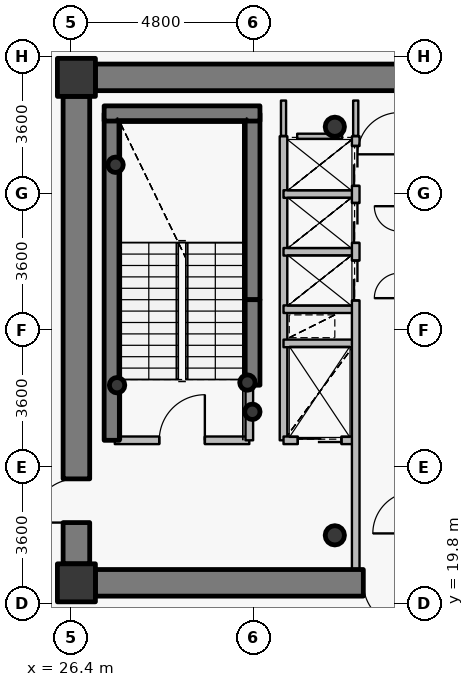
"""IFC4 building model, lengths in metres.
Left out: names, types, materials, properties, quantities, classifications, styles, units other than length and angle.
Written with IfcOpenShell. Run it as: python <this file> out.ifc"""

import sys

from ifc_helpers import new_model, si_unit, direction, frame, frame_2d, origin, origin_2d, place, context, subcontext, project, spatial, rectangle, hollow_circle, extrude, source, transform, mapped, element, fill, save


model = new_model("IFC4")
c1 = context("Model", 3, precision=1e-05, world=origin(), true_north=direction((0.0, 1.0)))
c2 = subcontext(c1, "Body", "Model", "MODEL_VIEW")
j1 = project(units=[si_unit("LENGTHUNIT", "METRE"), si_unit("PLANEANGLEUNIT", "RADIAN")], contexts=[c1])
p1 = place(None, origin())
s1 = spatial("IfcSite", under=j1, at=p1, CompositionType="ELEMENT")
p2 = place(p1, origin())
s2 = spatial("IfcBuilding", under=s1, at=p2, CompositionType="ELEMENT")
p3 = place(p2, frame((0.0, 0.0, 214.05)))
s3 = spatial("IfcBuildingStorey", under=s2, at=p3, CompositionType="ELEMENT", Elevation=214.05)
for number, where, z_axis, x_axis in (
    (1, (26.55, 20.35, 0.0), (0.0, 0.0, 1.0), (1.0, 0.0, 0.0)),
    (2, (26.55, 33.65, 0.0), (0.0, 0.0, 1.0), (1.0, 0.0, 0.0)),
):
    element("IfcColumn", number, at=place(p3, frame(where, z_axis=z_axis, x_axis=x_axis)), inside=s3, PredefinedType="COLUMN", context=c2, shape_type="SweptSolid", body=[
        extrude(rectangle(XDim=1.0, YDim=1.0, at=origin_2d()), origin(), (0.0, 0.0, 1.0), 3.75),
    ])
for number, where, z_axis, x_axis in (
    (3, (33.35, 21.6, 0.0), (0.0, 0.0, 1.0), (1.0, 0.0, 0.0)),
    (4, (33.35, 32.35, 0.0), (0.0, 0.0, 1.0), (1.0, 0.0, 0.0)),
):
    element("IfcColumn", number, at=place(p3, frame(where, z_axis=z_axis, x_axis=x_axis)), inside=s3, PredefinedType="COLUMN", context=c2, shape_type="SweptSolid", body=[
        extrude(hollow_circle(Radius=0.254, WallThickness=0.02, at=origin_2d()), origin(), (0.0, 0.0, 1.0), 3.75),
    ])
p4 = place(p3, frame((27.48, 24.1, 0.0), z_axis=(0.0, 0.0, 1.0), x_axis=(0.0, 1.0, 0.0)))
e5 = element("IfcWall", 5, at=p4, inside=s3, PredefinedType="SHEAR", context=c2, shape_type="SweptSolid", body=[
    extrude(rectangle(XDim=8.6, YDim=0.4, at=frame_2d((4.3, 0.0))), origin(), (0.0, 0.0, 1.0), 3.75),
])
p5 = place(p3, frame((31.18, 27.8, 0.0), z_axis=(0.0, 0.0, 1.0), x_axis=(0.0, 1.0, 0.0)))
e6 = element("IfcWall", 6, at=p5, inside=s3, PredefinedType="SHEAR", context=c2, shape_type="SweptSolid", body=[
    extrude(rectangle(XDim=4.9, YDim=0.4, at=frame_2d((2.45, 0.0))), origin(), (0.0, 0.0, 1.0), 3.75),
])
p6 = place(p3, frame((27.28, 32.7, 0.0), z_axis=(0.0, 0.0, 1.0), x_axis=(1.0, 0.0, 0.0)))
e7 = element("IfcWall", 7, at=p6, inside=s3, PredefinedType="SHEAR", context=c2, shape_type="SweptSolid", body=[
    extrude(rectangle(XDim=4.1, YDim=0.4, at=frame_2d((2.05, 0.0))), origin(), (0.0, 0.0, 1.0), 3.75),
])
for number, where, z_axis, x_axis in (
    (8, (27.58, 31.35, 0.0), (0.0, 0.0, 1.0), (1.0, 0.0, 0.0)),
    (9, (31.05, 25.62, 0.0), (0.0, 0.0, 1.0), (1.0, 0.0, 0.0)),
    (10, (31.18, 24.85, 0.0), (0.0, 0.0, 1.0), (1.0, 0.0, 0.0)),
    (11, (27.62, 25.55, 0.0), (0.0, 0.0, 1.0), (1.0, 0.0, 0.0)),
):
    element("IfcColumn", number, at=place(p3, frame(where, z_axis=z_axis, x_axis=x_axis)), inside=s3, PredefinedType="COLUMN", context=c2, shape_type="SweptSolid", body=[
        extrude(hollow_circle(Radius=0.203, WallThickness=0.016, at=origin_2d()), origin(), (0.0, 0.0, 1.0), 3.75),
    ])
p7 = place(p3, frame((27.05, 33.65, 0.0), z_axis=(0.0, 0.0, 1.0), x_axis=(1.0, 0.0, 0.0)))
e12 = element("IfcWall", 12, at=p7, inside=s3, PredefinedType="SHEAR", context=c2, shape_type="SweptSolid", body=[
    extrude(rectangle(XDim=17.9, YDim=0.7, at=frame_2d((8.95, 0.0))), origin(), (0.0, 0.0, 1.0), 3.05),
])
p8 = place(p7, frame((13.675, 0.0, 0.0)))
e13 = element("IfcOpeningElement", 13, at=p8, cuts=e12, PredefinedType="OPENING", context=c2, shape_type="SweptSolid", body=[
    extrude(rectangle(XDim=1.15, YDim=2.15, at=origin_2d()), frame((0.575, 0.36, 1.075), z_axis=(0.0, -1.0, 0.0), x_axis=(1.0, 0.0, 0.0)), (0.0, 0.0, 1.0), 0.72),
])
p9 = place(p3, frame((44.95, 20.35, 0.0), z_axis=(0.0, 0.0, 1.0), x_axis=(-1.0, 0.0, 0.0)))
e14 = element("IfcWall", 14, at=p9, inside=s3, PredefinedType="SHEAR", context=c2, shape_type="SweptSolid", body=[
    extrude(rectangle(XDim=17.9, YDim=0.7, at=frame_2d((8.95, 0.0))), origin(), (0.0, 0.0, 1.0), 3.05),
])
p10 = place(p9, frame((9.7, 0.0, 0.0)))
e15 = element("IfcOpeningElement", 15, at=p10, cuts=e14, PredefinedType="OPENING", context=c2, shape_type="SweptSolid", body=[
    extrude(rectangle(XDim=1.15, YDim=2.15, at=origin_2d()), frame((0.575, 0.36, 1.075), z_axis=(0.0, -1.0, 0.0), x_axis=(1.0, 0.0, 0.0)), (0.0, 0.0, 1.0), 0.72),
])
p11 = place(p3, frame((26.55, 20.85, 0.0), z_axis=(0.0, 0.0, 1.0), x_axis=(0.0, 1.0, 0.0)))
e16 = element("IfcWall", 16, at=p11, inside=s3, PredefinedType="SHEAR", context=c2, shape_type="SweptSolid", body=[
    extrude(rectangle(XDim=12.3, YDim=0.7, at=frame_2d((6.15, 0.0))), origin(), (0.0, 0.0, 1.0), 3.05),
])
p12 = place(p11, frame((1.085, 0.0, 0.0)))
e17 = element("IfcOpeningElement", 17, at=p12, cuts=e16, PredefinedType="OPENING", context=c2, shape_type="SweptSolid", body=[
    extrude(rectangle(XDim=1.15, YDim=2.15, at=origin_2d()), frame((0.575, 0.36, 1.075), z_axis=(0.0, -1.0, 0.0), x_axis=(1.0, 0.0, 0.0)), (0.0, 0.0, 1.0), 0.72),
])
p13 = place(p3, frame((31.18, 25.55, 0.0), z_axis=(0.0, 0.0, 1.0), x_axis=(0.0, 1.0, 0.0)))
e18 = element("IfcWall", 18, at=p13, inside=s3, PredefinedType="SHEAR", context=c2, shape_type="SweptSolid", body=[
    extrude(rectangle(XDim=2.25, YDim=0.4, at=frame_2d((1.125, 0.0))), origin(), (0.0, 0.0, 1.0), 3.1),
])
p14 = place(p3, frame((27.56, 24.1, 0.0), z_axis=(0.0, 0.0, 1.0), x_axis=(1.0, 0.0, 0.0)))
e19 = element("IfcWall", 19, at=p14, inside=s3, PredefinedType="PARTITIONING", context=c2, shape_type="SweptSolid", body=[
    extrude(rectangle(XDim=3.54, YDim=0.2, at=frame_2d((1.77, 0.0))), origin(), (0.0, 0.0, 1.0), 3.5),
])
p15 = place(p14, frame((1.17, 0.0, 0.0)))
e20 = element("IfcOpeningElement", 20, at=p15, cuts=e19, PredefinedType="OPENING", context=c2, shape_type="SweptSolid", body=[
    extrude(rectangle(XDim=1.2, YDim=2.15, at=origin_2d()), frame((0.6, 0.11, 1.075), z_axis=(0.0, -1.0, 0.0), x_axis=(1.0, 0.0, 0.0)), (0.0, 0.0, 1.0), 0.22),
])
p16 = place(p3, frame((31.1, 24.1, 0.0), z_axis=(0.0, 0.0, 1.0), x_axis=(0.0, 1.0, 0.0)))
e21 = element("IfcWall", 21, at=p16, inside=s3, PredefinedType="PARTITIONING", context=c2, shape_type="SweptSolid", body=[
    extrude(rectangle(XDim=1.44, YDim=0.2, at=frame_2d((0.72, 0.0))), origin(), (0.0, 0.0, 1.0), 3.5),
])
p17 = place(p3, frame((32.0, 24.1, 0.0), z_axis=(0.0, 0.0, 1.0), x_axis=(0.0, 1.0, 0.0)))
e22 = element("IfcWall", 22, at=p17, inside=s3, PredefinedType="PARTITIONING", context=c2, shape_type="SweptSolid", body=[
    extrude(rectangle(XDim=8.0, YDim=0.2, at=frame_2d((4.0, 0.0))), origin(), (0.0, 0.0, 1.0), 3.5),
])
p18 = place(p3, frame((32.0, 24.1, 0.0), z_axis=(0.0, 0.0, 1.0), x_axis=(1.0, 0.0, 0.0)))
e23 = element("IfcWall", 23, at=p18, inside=s3, PredefinedType="PARTITIONING", context=c2, shape_type="SweptSolid", body=[
    extrude(rectangle(XDim=1.9, YDim=0.2, at=frame_2d((0.95, 0.0))), origin(), (0.0, 0.0, 1.0), 3.085),
])
p19 = place(p18, frame((0.375, 0.0, 0.0)))
e24 = element("IfcOpeningElement", 24, at=p19, cuts=e23, PredefinedType="OPENING", context=c2, shape_type="SweptSolid", body=[
    extrude(rectangle(XDim=1.15, YDim=2.15, at=origin_2d()), frame((0.575, 0.11, 1.075), z_axis=(0.0, -1.0, 0.0), x_axis=(1.0, 0.0, 0.0)), (0.0, 0.0, 1.0), 0.22),
])
for number, where, z_axis, x_axis in (
    (25, (32.0, 26.65, 0.0), (0.0, 0.0, 1.0), (1.0, 0.0, 0.0)),
    (26, (32.0, 27.55, 0.0), (0.0, 0.0, 1.0), (1.0, 0.0, 0.0)),
    (27, (32.0, 29.06, 0.0), (0.0, 0.0, 1.0), (1.0, 0.0, 0.0)),
    (28, (32.0, 30.58, 0.0), (0.0, 0.0, 1.0), (1.0, 0.0, 0.0)),
):
    element("IfcWall", number, at=place(p3, frame(where, z_axis=z_axis, x_axis=x_axis)), inside=s3, PredefinedType="PARTITIONING", context=c2, shape_type="SweptSolid", body=[
        extrude(rectangle(XDim=1.9, YDim=0.2, at=frame_2d((0.95, 0.0))), origin(), (0.0, 0.0, 1.0), 3.085),
    ])
p20 = place(p3, frame((33.9, 20.7, 0.0), z_axis=(0.0, 0.0, 1.0), x_axis=(0.0, 1.0, 0.0)))
e29 = element("IfcWall", 29, at=p20, inside=s3, PredefinedType="PARTITIONING", context=c2, shape_type="SweptSolid", body=[
    extrude(rectangle(XDim=11.4, YDim=0.2, at=frame_2d((5.7, 0.0))), origin(), (0.0, 0.0, 1.0), 3.085),
])
p21 = place(p20, frame((7.08, 0.0, 0.0)))
e30 = element("IfcOpeningElement", 30, at=p21, cuts=e29, PredefinedType="OPENING", context=c2, shape_type="SweptSolid", body=[
    extrude(rectangle(XDim=1.05, YDim=2.15, at=origin_2d()), frame((0.525, 0.11, 1.075), z_axis=(0.0, -1.0, 0.0), x_axis=(1.0, 0.0, 0.0)), (0.0, 0.0, 1.0), 0.22),
])
p22 = place(p20, frame((8.595, 0.0, 0.0)))
e31 = element("IfcOpeningElement", 31, at=p22, cuts=e29, PredefinedType="OPENING", context=c2, shape_type="SweptSolid", body=[
    extrude(rectangle(XDim=1.05, YDim=2.15, at=origin_2d()), frame((0.525, 0.11, 1.075), z_axis=(0.0, -1.0, 0.0), x_axis=(1.0, 0.0, 0.0)), (0.0, 0.0, 1.0), 0.22),
])
p23 = place(p20, frame((10.095, 0.0, 0.0)))
e32 = element("IfcOpeningElement", 32, at=p23, cuts=e29, PredefinedType="OPENING", context=c2, shape_type="SweptSolid", body=[
    extrude(rectangle(XDim=1.05, YDim=2.15, at=origin_2d()), frame((0.525, 0.11, 1.075), z_axis=(0.0, -1.0, 0.0), x_axis=(1.0, 0.0, 0.0)), (0.0, 0.0, 1.0), 0.22),
])
p24 = place(p3, frame((32.36, 32.1, 0.0), z_axis=(0.0, 0.0, 1.0), x_axis=(1.0, 0.0, 0.0)))
e33 = element("IfcWall", 33, at=p24, inside=s3, PredefinedType="PARTITIONING", context=c2, shape_type="SweptSolid", body=[
    extrude(rectangle(XDim=1.18, YDim=0.135, at=frame_2d((0.59, 0.0))), origin(), (0.0, 0.0, 1.0), 3.085),
])
p25 = place(p3, frame((32.0, 33.04, 0.0), z_axis=(0.0, 0.0, 1.0), x_axis=(0.0, -1.0, 0.0)))
e34 = element("IfcWall", 34, at=p25, inside=s3, PredefinedType="PARTITIONING", context=c2, shape_type="SweptSolid", body=[
    extrude(rectangle(XDim=0.93, YDim=0.135, at=frame_2d((0.465, 0.0))), origin(), (0.0, 0.0, 1.0), 3.035),
])
p26 = place(p3, frame((33.9, 32.11, 0.0), z_axis=(0.0, 0.0, 1.0), x_axis=(0.0, 1.0, 0.0)))
e35 = element("IfcWall", 35, at=p26, inside=s3, PredefinedType="PARTITIONING", context=c2, shape_type="SweptSolid", body=[
    extrude(rectangle(XDim=0.93, YDim=0.135, at=frame_2d((0.465, 0.0))), origin(), (0.0, 0.0, 1.0), 3.085),
])
p27 = place(p3, frame((27.04, 34.0, 0.0), z_axis=(0.0, 0.0, 1.0), x_axis=(-1.0, 0.0, 0.0)))
e36 = element("IfcWall", 36, at=p27, inside=s3, PredefinedType="PARTITIONING", context=c2, shape_type="SweptSolid", body=[
    extrude(rectangle(XDim=0.84, YDim=0.135, at=frame_2d((0.42, 0.0))), origin(), (0.0, 0.0, 1.0), 2.935),
])
p28 = place(p3, frame((26.2, 33.692, 0.0), z_axis=(0.0, 0.0, 1.0), x_axis=(0.0, -1.0, 0.0)))
e37 = element("IfcWall", 37, at=p28, inside=s3, PredefinedType="PARTITIONING", context=c2, shape_type="SweptSolid", body=[
    extrude(rectangle(XDim=0.532, YDim=0.135, at=frame_2d((0.266, 0.0))), origin(), (0.0, 0.0, 1.0), 3.5),
])
p29 = place(p3, frame((26.2, 20.84, 0.0), z_axis=(0.0, 0.0, 1.0), x_axis=(0.0, -1.0, 0.0)))
e38 = element("IfcWall", 38, at=p29, inside=s3, PredefinedType="PARTITIONING", context=c2, shape_type="SweptSolid", body=[
    extrude(rectangle(XDim=0.84, YDim=0.135, at=frame_2d((0.42, 0.0))), origin(), (0.0, 0.0, 1.0), 3.5),
])
p30 = place(p3, frame((26.508, 20.0, 0.0), z_axis=(0.0, 0.0, 1.0), x_axis=(1.0, 0.0, 0.0)))
e39 = element("IfcWall", 39, at=p30, inside=s3, PredefinedType="PARTITIONING", context=c2, shape_type="SweptSolid", body=[
    extrude(rectangle(XDim=0.532, YDim=0.135, at=frame_2d((0.266, 0.0))), origin(), (0.0, 0.0, 1.0), 2.935),
])
m1 = source(origin(), c2, "Body", "SweptSolid", [
    extrude(rectangle(XDim=1.15, YDim=2.15, at=origin_2d()), frame((0.575, 0.025, 1.075), z_axis=(0.0, -1.0, 0.0), x_axis=(1.0, 0.0, 0.0)), (0.0, 0.0, 1.0), 0.05),
])
p31 = place(p12, origin())
e40 = element("IfcDoor", 40, at=p31, inside=s3, OperationType="SINGLE_SWING_LEFT", PredefinedType="DOOR", context=c2, shape_type="MappedRepresentation", body=[
    mapped(m1, transform((0.0, 0.0, 0.0), x_axis=(1.0, 0.0, 0.0), y_axis=(0.0, 1.0, 0.0), z_axis=(0.0, 0.0, 1.0), scale=1.0)),
])
fill(e17, e40)
p32 = place(p10, origin())
e41 = element("IfcDoor", 41, at=p32, inside=s3, OperationType="SINGLE_SWING_LEFT", PredefinedType="DOOR", context=c2, shape_type="MappedRepresentation", body=[
    mapped(m1, transform((0.0, 0.0, 0.0), x_axis=(1.0, 0.0, 0.0), y_axis=(0.0, 1.0, 0.0), z_axis=(0.0, 0.0, 1.0), scale=1.0)),
])
fill(e15, e41)
m2 = source(origin(), c2, "Body", "SweptSolid", [
    extrude(rectangle(XDim=1.2, YDim=2.15, at=origin_2d()), frame((0.6, 0.025, 1.075), z_axis=(0.0, -1.0, 0.0), x_axis=(1.0, 0.0, 0.0)), (0.0, 0.0, 1.0), 0.05),
])
p33 = place(p15, origin())
e42 = element("IfcDoor", 42, at=p33, inside=s3, OperationType="SINGLE_SWING_RIGHT", PredefinedType="DOOR", context=c2, shape_type="MappedRepresentation", body=[
    mapped(m2, transform((0.0, 0.0, 0.0), x_axis=(1.0, 0.0, 0.0), y_axis=(0.0, 1.0, 0.0), z_axis=(0.0, 0.0, 1.0), scale=1.0)),
])
fill(e20, e42)
m3 = source(origin(), c2, "Body", "SweptSolid", [
    extrude(rectangle(XDim=1.15, YDim=2.15, at=origin_2d()), frame((0.575, 0.025, 1.075), z_axis=(0.0, -1.0, 0.0), x_axis=(1.0, 0.0, 0.0)), (0.0, 0.0, 1.0), 0.05),
])
p34 = place(p19, origin())
e43 = element("IfcDoor", 43, at=p34, inside=s3, OperationType="DOUBLE_DOOR_SLIDING", PredefinedType="USERDEFINED", context=c2, shape_type="MappedRepresentation", body=[
    mapped(m3, transform((0.0, 0.0, 0.0), x_axis=(1.0, 0.0, 0.0), y_axis=(0.0, 1.0, 0.0), z_axis=(0.0, 0.0, 1.0), scale=1.0)),
])
fill(e24, e43)
m4 = source(origin(), c2, "Body", "SweptSolid", [
    extrude(rectangle(XDim=1.05, YDim=2.15, at=origin_2d()), frame((0.525, 0.025, 1.075), z_axis=(0.0, -1.0, 0.0), x_axis=(1.0, 0.0, 0.0)), (0.0, 0.0, 1.0), 0.05),
])
p35 = place(p21, origin())
e44 = element("IfcDoor", 44, at=p35, inside=s3, OperationType="DOUBLE_DOOR_SLIDING", PredefinedType="USERDEFINED", context=c2, shape_type="MappedRepresentation", body=[
    mapped(m4, transform((0.0, 0.0, 0.0), x_axis=(1.0, 0.0, 0.0), y_axis=(0.0, 1.0, 0.0), z_axis=(0.0, 0.0, 1.0), scale=1.0)),
])
fill(e30, e44)
p36 = place(p22, origin())
e45 = element("IfcDoor", 45, at=p36, inside=s3, OperationType="DOUBLE_DOOR_SLIDING", PredefinedType="USERDEFINED", context=c2, shape_type="MappedRepresentation", body=[
    mapped(m4, transform((0.0, 0.0, 0.0), x_axis=(1.0, 0.0, 0.0), y_axis=(0.0, 1.0, 0.0), z_axis=(0.0, 0.0, 1.0), scale=1.0)),
])
fill(e31, e45)
p37 = place(p23, origin())
e46 = element("IfcDoor", 46, at=p37, inside=s3, OperationType="DOUBLE_DOOR_SLIDING", PredefinedType="USERDEFINED", context=c2, shape_type="MappedRepresentation", body=[
    mapped(m4, transform((0.0, 0.0, 0.0), x_axis=(1.0, 0.0, 0.0), y_axis=(0.0, 1.0, 0.0), z_axis=(0.0, 0.0, 1.0), scale=1.0)),
])
fill(e32, e46)
save(model, sys.argv[1])
